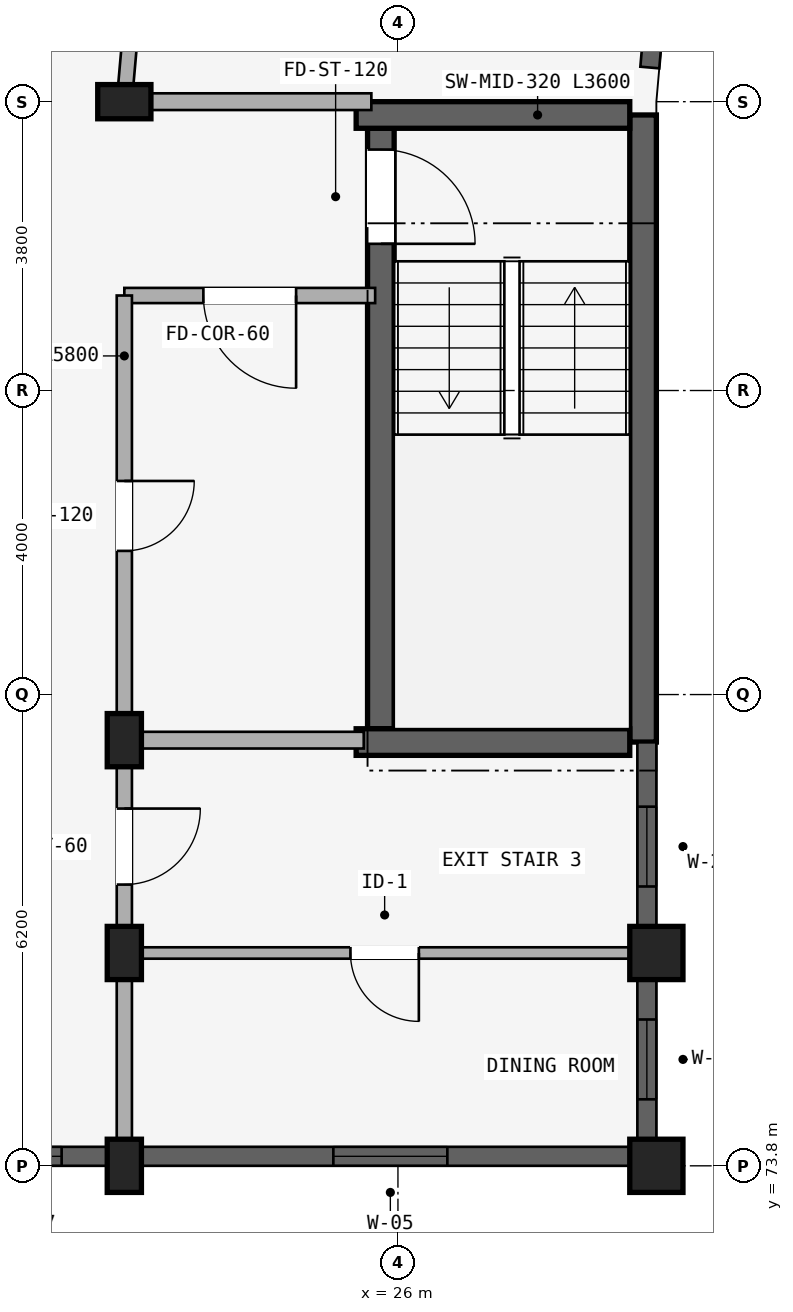
"""IFC4 building model, lengths in metres.
Left out: names, types, materials, properties, quantities, classifications, styles, units other than length and angle.
Written with IfcOpenShell. Run it as: python <this file> out.ifc"""

import sys

from ifc_helpers import new_model, si_unit, direction, frame, frame_2d, origin, origin_2d, place, context, subcontext, project, spatial, rectangle, extrude, element, fill, save


model = new_model("IFC4")
c1 = context("Model", 3, precision=1e-05, world=origin(), true_north=direction((0.0, 1.0)))
c2 = subcontext(c1, "Body", "Model", "MODEL_VIEW")
j1 = project(units=[si_unit("LENGTHUNIT", "METRE"), si_unit("PLANEANGLEUNIT", "RADIAN")], contexts=[c1])
p1 = place(None, origin())
s1 = spatial("IfcSite", under=j1, at=p1, CompositionType="ELEMENT")
p2 = place(p1, origin())
s2 = spatial("IfcBuilding", under=s1, at=p2, CompositionType="ELEMENT")
p3 = place(p2, frame((0.0, 0.0, 21.3)))
s3 = spatial("IfcBuildingStorey", under=s2, at=p3, CompositionType="ELEMENT", Elevation=21.3)
p4 = place(p3, frame((29.225, 87.625, 0.0), z_axis=(0.0, 0.0, 1.0), x_axis=(0.0, -1.0, 0.0)))
e1 = element("IfcWall", 1, at=p4, inside=s3, PredefinedType="SHEAR", context=c2, shape_type="SweptSolid", body=[
    extrude(rectangle(XDim=8.25, YDim=0.35, at=frame_2d((4.125, 0.0))), origin(), (0.0, 0.0, 1.0), 2.93),
])
p5 = place(p3, frame((25.775, 87.45, 0.0), z_axis=(0.0, 0.0, 1.0), x_axis=(0.0, -1.0, 0.0)))
e2 = element("IfcWall", 2, at=p5, inside=s3, PredefinedType="SHEAR", context=c2, shape_type="SweptSolid", body=[
    extrude(rectangle(XDim=7.9, YDim=0.35, at=frame_2d((3.95, 0.0))), origin(), (0.0, 0.0, 1.0), 2.93),
])
p6 = place(p5, frame((0.28, 0.0, 0.0)))
e3 = element("IfcOpeningElement", 3, at=p6, cuts=e2, PredefinedType="OPENING", context=c2, shape_type="SweptSolid", body=[
    extrude(rectangle(XDim=1.24, YDim=2.15, at=frame_2d((0.62, 1.075))), frame((0.0, 0.185, 0.0), z_axis=(0.0, -1.0, 0.0), x_axis=(1.0, 0.0, 0.0)), (0.0, 0.0, 1.0), 0.37),
])
for number, where, z_axis, x_axis in (
    (4, (29.05, 87.625, 0.0), (0.0, 0.0, 1.0), (-1.0, 0.0, 0.0)),
    (5, (29.05, 79.375, 0.0), (0.0, 0.0, 1.0), (-1.0, 0.0, 0.0)),
):
    element("IfcWall", number, at=place(p3, frame(where, z_axis=z_axis, x_axis=x_axis)), inside=s3, PredefinedType="SHEAR", context=c2, shape_type="SweptSolid", body=[
        extrude(rectangle(XDim=3.6, YDim=0.35, at=frame_2d((1.8, 0.0))), origin(), (0.0, 0.0, 1.0), 2.93),
    ])
for number, where, z_axis, x_axis in (
    (6, (22.4, 87.8, 0.0), (0.0, 0.0, 1.0), (0.0, 1.0, 0.0)),
    (7, (22.4, 79.4, 0.0), (0.0, 0.0, 1.0), (1.0, 0.0, 0.0)),
):
    element("IfcColumn", number, at=place(p3, frame(where, z_axis=z_axis, x_axis=x_axis)), inside=s3, PredefinedType="COLUMN", context=c2, shape_type="SweptSolid", body=[
        extrude(rectangle(XDim=0.45, YDim=0.7, at=origin_2d()), origin(), (0.0, 0.0, 1.0), 2.93),
    ])
p7 = place(p3, frame((29.4, 76.6, 0.0), z_axis=(0.0, 0.0, 1.0), x_axis=(1.0, 0.0, 0.0)))
e8 = element("IfcColumn", 8, at=p7, inside=s3, PredefinedType="COLUMN", context=c2, shape_type="SweptSolid", body=[
    extrude(rectangle(XDim=0.7, YDim=0.7, at=origin_2d()), origin(), (0.0, 0.0, 1.0), 2.93),
])
p8 = place(p3, frame((22.4, 76.6, 0.0), z_axis=(0.0, 0.0, 1.0), x_axis=(1.0, 0.0, 0.0)))
e9 = element("IfcColumn", 9, at=p8, inside=s3, PredefinedType="COLUMN", context=c2, shape_type="SweptSolid", body=[
    extrude(rectangle(XDim=0.45, YDim=0.7, at=origin_2d()), origin(), (0.0, 0.0, 1.0), 2.93),
])
p9 = place(p3, frame((29.4, 73.8, 0.0), z_axis=(0.0, 0.0, 1.0), x_axis=(1.0, 0.0, 0.0)))
e10 = element("IfcColumn", 10, at=p9, inside=s3, PredefinedType="COLUMN", context=c2, shape_type="SweptSolid", body=[
    extrude(rectangle(XDim=0.7, YDim=0.7, at=origin_2d()), origin(), (0.0, 0.0, 1.0), 2.93),
])
p10 = place(p3, frame((22.4, 73.8, 0.0), z_axis=(0.0, 0.0, 1.0), x_axis=(1.0, 0.0, 0.0)))
e11 = element("IfcColumn", 11, at=p10, inside=s3, PredefinedType="COLUMN", context=c2, shape_type="SweptSolid", body=[
    extrude(rectangle(XDim=0.45, YDim=0.7, at=origin_2d()), origin(), (0.0, 0.0, 1.0), 2.93),
])
p11 = place(p3, frame((25.7, 85.25, 0.0), z_axis=(0.0, 0.0, 1.0), x_axis=(-1.0, 0.0, 0.0)))
e12 = element("IfcWall", 12, at=p11, inside=s3, PredefinedType="STANDARD", context=c2, shape_type="SweptSolid", body=[
    extrude(rectangle(XDim=3.3, YDim=0.2, at=frame_2d((1.65, 0.0))), origin(), (0.0, 0.0, 1.0), 2.372),
])
p12 = place(p11, frame((1.04, 0.0, 0.0)))
e13 = element("IfcOpeningElement", 13, at=p12, cuts=e12, PredefinedType="OPENING", context=c2, shape_type="SweptSolid", body=[
    extrude(rectangle(XDim=1.22, YDim=2.15, at=frame_2d((0.61, 1.075))), frame((0.0, 0.11, 0.0), z_axis=(0.0, -1.0, 0.0), x_axis=(1.0, 0.0, 0.0)), (0.0, 0.0, 1.0), 0.22),
])
p13 = place(p3, frame((22.4, 85.25, 0.0), z_axis=(0.0, 0.0, 1.0), x_axis=(0.0, -1.0, 0.0)))
e14 = element("IfcWall", 14, at=p13, inside=s3, PredefinedType="STANDARD", context=c2, shape_type="SweptSolid", body=[
    extrude(rectangle(XDim=5.8, YDim=0.2, at=frame_2d((2.9, 0.0))), origin(), (0.0, 0.0, 1.0), 2.372),
])
p14 = place(p13, frame((2.44, 0.0, 0.0)))
e15 = element("IfcOpeningElement", 15, at=p14, cuts=e14, PredefinedType="OPENING", context=c2, shape_type="SweptSolid", body=[
    extrude(rectangle(XDim=0.92, YDim=2.1, at=frame_2d((0.46, 1.05))), frame((0.0, 0.11, 0.0), z_axis=(0.0, -1.0, 0.0), x_axis=(1.0, 0.0, 0.0)), (0.0, 0.0, 1.0), 0.22),
])
p15 = place(p3, frame((22.792, 92.28, 0.0), z_axis=(0.0, 0.0, 1.0), x_axis=(-0.087187153726, -0.996191949488, 0.0)))
e16 = element("IfcWall", 16, at=p15, inside=s3, PredefinedType="STANDARD", context=c2, shape_type="SweptSolid", body=[
    extrude(rectangle(XDim=4.497, YDim=0.2, at=frame_2d((2.249, 0.0))), origin(), (0.0, 0.0, 1.0), 2.372),
])
p16 = place(p3, frame((25.65, 87.8, 0.0), z_axis=(0.0, 0.0, 1.0), x_axis=(-1.0, 0.0, 0.0)))
e17 = element("IfcWall", 17, at=p16, inside=s3, PredefinedType="STANDARD", context=c2, shape_type="SweptSolid", body=[
    extrude(rectangle(XDim=3.2, YDim=0.22, at=frame_2d((1.6, 0.0))), origin(), (0.0, 0.0, 1.0), 2.372),
])
p17 = place(p3, frame((22.4, 79.4, 0.0), z_axis=(0.0, 0.0, 1.0), x_axis=(0.0, -1.0, 0.0)))
e18 = element("IfcWall", 18, at=p17, inside=s3, PredefinedType="STANDARD", context=c2, shape_type="SweptSolid", body=[
    extrude(rectangle(XDim=2.8, YDim=0.2, at=frame_2d((1.4, 0.0))), origin(), (0.0, 0.0, 1.0), 2.372),
])
p18 = place(p17, frame((0.9, 0.0, 0.0)))
e19 = element("IfcOpeningElement", 19, at=p18, cuts=e18, PredefinedType="OPENING", context=c2, shape_type="SweptSolid", body=[
    extrude(rectangle(XDim=1.0, YDim=2.15, at=frame_2d((0.5, 1.075))), frame((0.0, 0.11, 0.0), z_axis=(0.0, -1.0, 0.0), x_axis=(1.0, 0.0, 0.0)), (0.0, 0.0, 1.0), 0.22),
])
p19 = place(p3, frame((25.55, 79.4, 0.0), z_axis=(0.0, 0.0, 1.0), x_axis=(-1.0, 0.0, 0.0)))
e20 = element("IfcWall", 20, at=p19, inside=s3, PredefinedType="STANDARD", context=c2, shape_type="SweptSolid", body=[
    extrude(rectangle(XDim=3.1, YDim=0.22, at=frame_2d((1.55, 0.0))), origin(), (0.0, 0.0, 1.0), 2.372),
])
p20 = place(p3, frame((22.4, 76.6, 0.0), z_axis=(0.0, 0.0, 1.0), x_axis=(0.0, -1.0, 0.0)))
e21 = element("IfcWall", 21, at=p20, inside=s3, PredefinedType="STANDARD", context=c2, shape_type="SweptSolid", body=[
    extrude(rectangle(XDim=2.8, YDim=0.2, at=frame_2d((1.4, 0.0))), origin(), (0.0, 0.0, 1.0), 2.372),
])
p21 = place(p3, frame((29.2, 76.6, 0.0), z_axis=(0.0, 0.0, 1.0), x_axis=(-1.0, 0.0, 0.0)))
e22 = element("IfcWall", 22, at=p21, inside=s3, PredefinedType="PARTITIONING", context=c2, shape_type="SweptSolid", body=[
    extrude(rectangle(XDim=6.75, YDim=0.15, at=frame_2d((3.375, 0.0))), origin(), (0.0, 0.0, 1.0), 2.372),
])
p22 = place(p21, frame((2.925, 0.0, 0.0)))
e23 = element("IfcOpeningElement", 23, at=p22, cuts=e22, PredefinedType="OPENING", context=c2, shape_type="SweptSolid", body=[
    extrude(rectangle(XDim=0.9, YDim=2.1, at=frame_2d((0.45, 1.05))), frame((0.0, 0.085, 0.0), z_axis=(0.0, -1.0, 0.0), x_axis=(1.0, 0.0, 0.0)), (0.0, 0.0, 1.0), 0.17),
])
p23 = place(p3, frame((29.539, 90.823, 0.0), z_axis=(0.0, 0.0, 1.0), x_axis=(-0.087229084652, -0.996188278786, 0.0)))
e24 = element("IfcWall", 24, at=p23, inside=s3, PredefinedType="STANDARD", context=c2, shape_type="SweptSolid", body=[
    extrude(rectangle(XDim=2.583, YDim=0.25, at=frame_2d((1.292, 0.0))), origin(), (0.0, 0.0, 1.0), 2.472),
])
p24 = place(p23, frame((0.785, 0.0, 0.772)))
e25 = element("IfcOpeningElement", 25, at=p24, cuts=e24, PredefinedType="OPENING", context=c2, shape_type="SweptSolid", body=[
    extrude(rectangle(XDim=1.2, YDim=1.5, at=frame_2d((0.6, 0.75))), frame((0.0, 0.135, 0.0), z_axis=(0.0, -1.0, 0.0), x_axis=(1.0, 0.0, 0.0)), (0.0, 0.0, 1.0), 0.27),
])
p25 = place(p3, frame((29.275, 79.372, 0.0), z_axis=(0.0, 0.0, 1.0), x_axis=(0.0, -1.0, 0.0)))
e26 = element("IfcWall", 26, at=p25, inside=s3, PredefinedType="STANDARD", context=c2, shape_type="SweptSolid", body=[
    extrude(rectangle(XDim=2.418, YDim=0.25, at=frame_2d((1.209, 0.0))), origin(), (0.0, 0.0, 1.0), 2.472),
])
p26 = place(p25, frame((0.846, 0.0, 0.88)))
e27 = element("IfcOpeningElement", 27, at=p26, cuts=e26, PredefinedType="OPENING", context=c2, shape_type="SweptSolid", body=[
    extrude(rectangle(XDim=1.05, YDim=1.25, at=frame_2d((0.525, 0.625))), frame((0.0, 0.135, 0.0), z_axis=(0.0, -1.0, 0.0), x_axis=(1.0, 0.0, 0.0)), (0.0, 0.0, 1.0), 0.27),
])
p27 = place(p3, frame((29.275, 76.247, 0.0), z_axis=(0.0, 0.0, 1.0), x_axis=(0.0, -1.0, 0.0)))
e28 = element("IfcWall", 28, at=p27, inside=s3, PredefinedType="STANDARD", context=c2, shape_type="SweptSolid", body=[
    extrude(rectangle(XDim=2.093, YDim=0.25, at=frame_2d((1.046, 0.0))), origin(), (0.0, 0.0, 1.0), 2.472),
])
p28 = place(p27, frame((0.521, 0.0, 0.88)))
e29 = element("IfcOpeningElement", 29, at=p28, cuts=e28, PredefinedType="OPENING", context=c2, shape_type="SweptSolid", body=[
    extrude(rectangle(XDim=1.05, YDim=1.25, at=frame_2d((0.525, 0.625))), frame((0.0, 0.135, 0.0), z_axis=(0.0, -1.0, 0.0), x_axis=(1.0, 0.0, 0.0)), (0.0, 0.0, 1.0), 0.27),
])
p29 = place(p3, frame((29.046, 73.925, 0.0), z_axis=(0.0, 0.0, 1.0), x_axis=(-1.0, 0.0, 0.0)))
e30 = element("IfcWall", 30, at=p29, inside=s3, PredefinedType="STANDARD", context=c2, shape_type="SweptSolid", body=[
    extrude(rectangle(XDim=6.418, YDim=0.25, at=frame_2d((3.209, 0.0))), origin(), (0.0, 0.0, 1.0), 2.372),
])
p30 = place(p29, frame((2.396, 0.0, 0.522)))
e31 = element("IfcOpeningElement", 31, at=p30, cuts=e30, PredefinedType="OPENING", context=c2, shape_type="SweptSolid", body=[
    extrude(rectangle(XDim=1.5, YDim=1.65, at=frame_2d((0.75, 0.825))), frame((0.0, 0.135, 0.0), z_axis=(0.0, -1.0, 0.0), x_axis=(1.0, 0.0, 0.0)), (0.0, 0.0, 1.0), 0.27),
])
p31 = place(p3, frame((22.171, 73.925, 0.0), z_axis=(0.0, 0.0, 1.0), x_axis=(-1.0, 0.0, 0.0)))
e32 = element("IfcWall", 32, at=p31, inside=s3, PredefinedType="STANDARD", context=c2, shape_type="SweptSolid", body=[
    extrude(rectangle(XDim=1.943, YDim=0.25, at=frame_2d((0.971, 0.0))), origin(), (0.0, 0.0, 1.0), 2.372),
])
p32 = place(p31, frame((0.596, 0.0, 0.88)))
e33 = element("IfcOpeningElement", 33, at=p32, cuts=e32, PredefinedType="OPENING", context=c2, shape_type="SweptSolid", body=[
    extrude(rectangle(XDim=0.75, YDim=1.05, at=frame_2d((0.375, 0.525))), frame((0.0, 0.135, 0.0), z_axis=(0.0, -1.0, 0.0), x_axis=(1.0, 0.0, 0.0)), (0.0, 0.0, 1.0), 0.27),
])
p33 = place(p26, origin())
e34 = element("IfcWindow", 34, at=p33, inside=s3, PartitioningType="SINGLE_PANEL", PredefinedType="WINDOW", context=c2, shape_type="SweptSolid", body=[
    extrude(rectangle(XDim=1.05, YDim=1.25, at=frame_2d((0.525, 0.625))), frame((0.0, 0.03, 0.0), z_axis=(0.0, -1.0, 0.0), x_axis=(1.0, 0.0, 0.0)), (0.0, 0.0, 1.0), 0.06),
])
fill(e27, e34)
p34 = place(p28, origin())
e35 = element("IfcWindow", 35, at=p34, inside=s3, PartitioningType="SINGLE_PANEL", PredefinedType="WINDOW", context=c2, shape_type="SweptSolid", body=[
    extrude(rectangle(XDim=1.05, YDim=1.25, at=frame_2d((0.525, 0.625))), frame((0.0, 0.03, 0.0), z_axis=(0.0, -1.0, 0.0), x_axis=(1.0, 0.0, 0.0)), (0.0, 0.0, 1.0), 0.06),
])
fill(e29, e35)
p35 = place(p30, origin())
e36 = element("IfcWindow", 36, at=p35, inside=s3, PartitioningType="DOUBLE_PANEL_VERTICAL", PredefinedType="WINDOW", context=c2, shape_type="SweptSolid", body=[
    extrude(rectangle(XDim=1.5, YDim=1.65, at=frame_2d((0.75, 0.825))), frame((0.0, 0.03, 0.0), z_axis=(0.0, -1.0, 0.0), x_axis=(1.0, 0.0, 0.0)), (0.0, 0.0, 1.0), 0.06),
])
fill(e31, e36)
p36 = place(p32, origin())
e37 = element("IfcWindow", 37, at=p36, inside=s3, PartitioningType="SINGLE_PANEL", PredefinedType="WINDOW", context=c2, shape_type="SweptSolid", body=[
    extrude(rectangle(XDim=0.75, YDim=1.05, at=frame_2d((0.375, 0.525))), frame((0.0, 0.03, 0.0), z_axis=(0.0, -1.0, 0.0), x_axis=(1.0, 0.0, 0.0)), (0.0, 0.0, 1.0), 0.06),
])
fill(e33, e37)
p37 = place(p6, origin())
e38 = element("IfcDoor", 38, at=p37, inside=s3, OperationType="SINGLE_SWING_RIGHT", PredefinedType="DOOR", context=c2, shape_type="SweptSolid", body=[
    extrude(rectangle(XDim=1.24, YDim=2.15, at=frame_2d((0.62, 1.075))), frame((0.0, 0.025, 0.0), z_axis=(0.0, -1.0, 0.0), x_axis=(1.0, 0.0, 0.0)), (0.0, 0.0, 1.0), 0.05),
])
fill(e3, e38)
p38 = place(p12, frame((1.22, 0.0, 0.0), z_axis=(0.0, 0.0, 1.0), x_axis=(-1.0, 0.0, 0.0)))
e39 = element("IfcDoor", 39, at=p38, inside=s3, OperationType="SINGLE_SWING_RIGHT", PredefinedType="DOOR", context=c2, shape_type="SweptSolid", body=[
    extrude(rectangle(XDim=1.22, YDim=2.15, at=frame_2d((0.61, 1.075))), frame((0.0, 0.025, 0.0), z_axis=(0.0, -1.0, 0.0), x_axis=(1.0, 0.0, 0.0)), (0.0, 0.0, 1.0), 0.05),
])
fill(e13, e39)
p39 = place(p14, origin())
e40 = element("IfcDoor", 40, at=p39, inside=s3, OperationType="SINGLE_SWING_LEFT", PredefinedType="DOOR", context=c2, shape_type="SweptSolid", body=[
    extrude(rectangle(XDim=0.92, YDim=2.1, at=frame_2d((0.46, 1.05))), frame((0.0, 0.025, 0.0), z_axis=(0.0, -1.0, 0.0), x_axis=(1.0, 0.0, 0.0)), (0.0, 0.0, 1.0), 0.05),
])
fill(e15, e40)
p40 = place(p18, origin())
e41 = element("IfcDoor", 41, at=p40, inside=s3, OperationType="SINGLE_SWING_LEFT", PredefinedType="DOOR", context=c2, shape_type="SweptSolid", body=[
    extrude(rectangle(XDim=1.0, YDim=2.15, at=frame_2d((0.5, 1.075))), frame((0.0, 0.025, 0.0), z_axis=(0.0, -1.0, 0.0), x_axis=(1.0, 0.0, 0.0)), (0.0, 0.0, 1.0), 0.05),
])
fill(e19, e41)
p41 = place(p22, origin())
e42 = element("IfcDoor", 42, at=p41, inside=s3, OperationType="SINGLE_SWING_LEFT", PredefinedType="DOOR", context=c2, shape_type="SweptSolid", body=[
    extrude(rectangle(XDim=0.9, YDim=2.1, at=frame_2d((0.45, 1.05))), frame((0.0, 0.025, 0.0), z_axis=(0.0, -1.0, 0.0), x_axis=(1.0, 0.0, 0.0)), (0.0, 0.0, 1.0), 0.05),
])
fill(e23, e42)
save(model, sys.argv[1])
